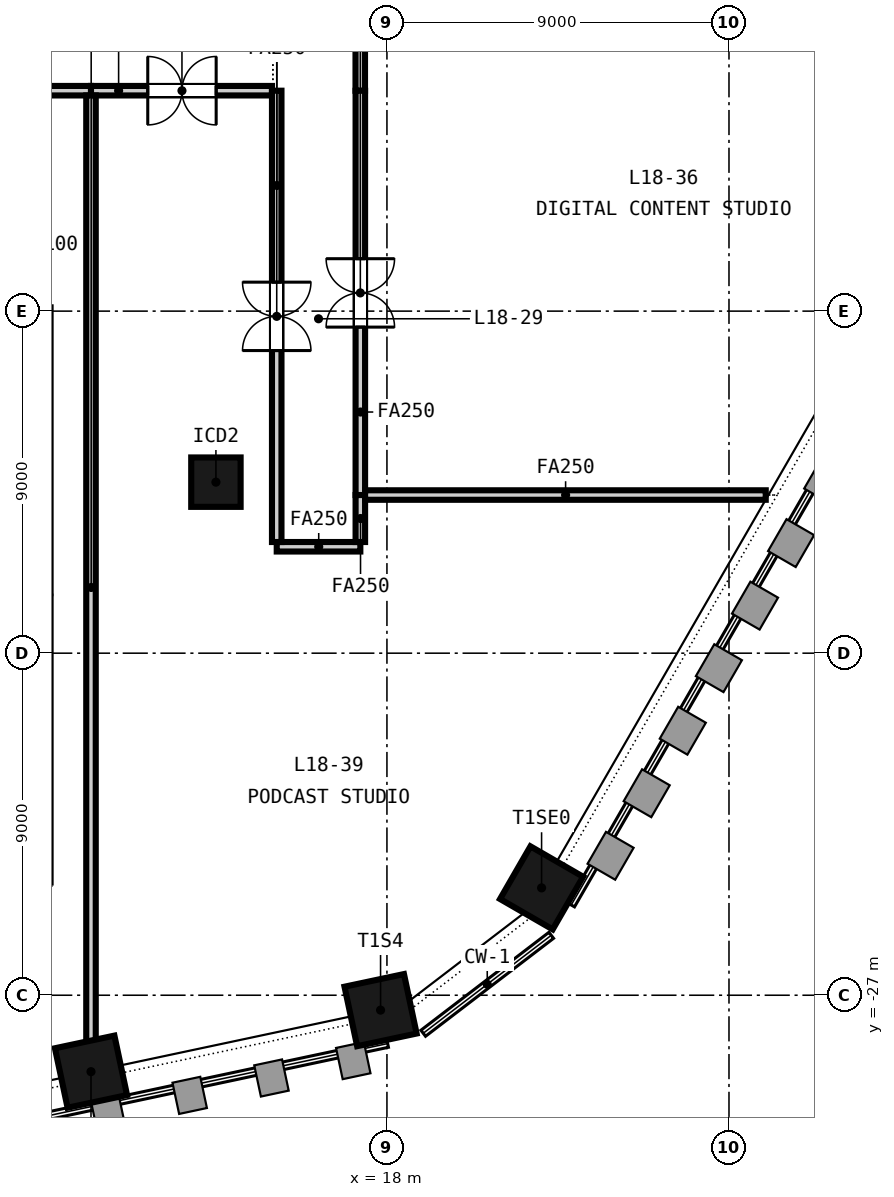
"""IFC4 building model, lengths in metres.
Left out: names, types, materials, properties, quantities, classifications, styles, units other than length and angle.
Written with IfcOpenShell. Run it as: python <this file> out.ifc"""

import sys

from ifc_helpers import new_model, si_unit, direction, frame, frame_2d, origin, origin_2d, place, context, subcontext, project, spatial, rectangle, extrude, element, fill, save


model = new_model("IFC4")
c1 = context("Model", 3, precision=1e-05, world=origin(), true_north=direction((0.0, 1.0)))
c2 = subcontext(c1, "Body", "Model", "MODEL_VIEW")
j1 = project(units=[si_unit("LENGTHUNIT", "METRE"), si_unit("PLANEANGLEUNIT", "RADIAN")], contexts=[c1])
p1 = place(None, origin())
s1 = spatial("IfcSite", under=j1, at=p1, CompositionType="ELEMENT")
p2 = place(p1, origin())
s2 = spatial("IfcBuilding", under=s1, at=p2, CompositionType="ELEMENT")
p3 = place(p2, frame((0.0, 0.0, 80.65)))
s3 = spatial("IfcBuildingStorey", under=s2, at=p3, CompositionType="ELEMENT", Elevation=80.65)
for number, where, z_axis, x_axis in (
    (1, (10.213, -29.011, -0.15), (0.0, 0.0, 1.0), (0.978, 0.208, 0.0)),
    (2, (17.832, -27.392, -0.15), (0.0, 0.0, 1.0), (0.978, 0.208, 0.0)),
    (3, (22.069, -24.175, -0.15), (0.0, 0.0, 1.0), (0.5, 0.866, 0.0)),
):
    element("IfcColumn", number, at=place(p3, frame(where, z_axis=z_axis, x_axis=x_axis)), inside=s3, PredefinedType="COLUMN", context=c2, shape_type="SweptSolid", body=[
        extrude(rectangle(XDim=1.6, YDim=1.6, at=origin_2d()), origin(), (0.0, 0.0, 1.0), 3.65),
    ])
p4 = place(p3, frame((13.5, -13.5, -0.15), z_axis=(0.0, 0.0, 1.0), x_axis=(1.0, 0.0, 0.0)))
e4 = element("IfcColumn", 4, at=p4, inside=s3, PredefinedType="COLUMN", context=c2, shape_type="SweptSolid", body=[
    extrude(rectangle(XDim=1.3, YDim=1.3, at=origin_2d()), origin(), (0.0, 0.0, 1.0), 3.65),
])
p5 = place(p3, frame((10.213, -3.2, 0.0), z_axis=(0.0, 0.0, 1.0), x_axis=(-1.0, 0.0, 0.0)))
e5 = element("IfcWall", 5, at=p5, inside=s3, PredefinedType="PARTITIONING", context=c2, shape_type="SweptSolid", body=[
    extrude(rectangle(XDim=25.188, YDim=0.25, at=frame_2d((12.594, 0.0))), origin(), (0.0, 0.0, 1.0), 2.741),
])
p6 = place(p5, frame((11.707, 0.0, 0.0)))
e6 = element("IfcOpeningElement", 6, at=p6, cuts=e5, PredefinedType="OPENING", context=c2, shape_type="SweptSolid", body=[
    extrude(rectangle(XDim=1.8, YDim=2.1, at=frame_2d((0.9, 1.05))), frame((0.0, 0.135, 0.0), z_axis=(0.0, -1.0, 0.0), x_axis=(1.0, 0.0, 0.0)), (0.0, 0.0, 1.0), 0.27),
])
p7 = place(p3, frame((14.975, -3.2, 0.0), z_axis=(0.0, 0.0, 1.0), x_axis=(-1.0, 0.0, 0.0)))
e7 = element("IfcWall", 7, at=p7, inside=s3, PredefinedType="PARTITIONING", context=c2, shape_type="SweptSolid", body=[
    extrude(rectangle(XDim=4.762, YDim=0.25, at=frame_2d((2.381, 0.0))), origin(), (0.0, 0.0, 1.0), 2.741),
])
p8 = place(p7, frame((1.469, 0.0, 0.0)))
e8 = element("IfcOpeningElement", 8, at=p8, cuts=e7, PredefinedType="OPENING", context=c2, shape_type="SweptSolid", body=[
    extrude(rectangle(XDim=1.8, YDim=2.1, at=frame_2d((0.9, 1.05))), frame((0.0, 0.135, 0.0), z_axis=(0.0, -1.0, 0.0), x_axis=(1.0, 0.0, 0.0)), (0.0, 0.0, 1.0), 0.27),
])
p9 = place(p3, frame((17.298, 2.102, 0.0), z_axis=(0.0, 0.0, 1.0), x_axis=(0.0, -1.0, 0.0)))
e9 = element("IfcWall", 9, at=p9, inside=s3, PredefinedType="PARTITIONING", context=c2, shape_type="SweptSolid", body=[
    extrude(rectangle(XDim=5.304, YDim=0.25, at=frame_2d((2.652, 0.0))), origin(), (0.0, 0.0, 1.0), 2.741),
])
p10 = place(p3, frame((17.3, -3.202, 0.0), z_axis=(0.0, 0.0, 1.0), x_axis=(0.0, -1.0, 0.0)))
e10 = element("IfcWall", 10, at=p10, inside=s3, PredefinedType="PARTITIONING", context=c2, shape_type="SweptSolid", body=[
    extrude(rectangle(XDim=10.637, YDim=0.25, at=frame_2d((5.319, 0.0))), origin(), (0.0, 0.0, 1.0), 2.741),
])
p11 = place(p10, frame((4.418, 0.0, 0.0)))
e11 = element("IfcOpeningElement", 11, at=p11, cuts=e10, PredefinedType="OPENING", context=c2, shape_type="SweptSolid", body=[
    extrude(rectangle(XDim=1.8, YDim=2.1, at=frame_2d((0.9, 1.05))), frame((0.0, 0.135, 0.0), z_axis=(0.0, -1.0, 0.0), x_axis=(1.0, 0.0, 0.0)), (0.0, 0.0, 1.0), 0.27),
])
p12 = place(p3, frame((17.3, -15.2, 0.0), z_axis=(0.0, 0.0, 1.0), x_axis=(-1.0, 0.0, 0.0)))
e12 = element("IfcWall", 12, at=p12, inside=s3, PredefinedType="PARTITIONING", context=c2, shape_type="SweptSolid", body=[
    extrude(rectangle(XDim=2.2, YDim=0.25, at=frame_2d((1.1, 0.0))), origin(), (0.0, 0.0, 1.0), 2.741),
])
p13 = place(p3, frame((17.3, -13.839, 0.0), z_axis=(0.0, 0.0, 1.0), x_axis=(0.0, -1.0, 0.0)))
e13 = element("IfcWall", 13, at=p13, inside=s3, PredefinedType="PARTITIONING", context=c2, shape_type="SweptSolid", body=[
    extrude(rectangle(XDim=1.236, YDim=0.25, at=frame_2d((0.618, 0.0))), origin(), (0.0, 0.0, 1.0), 2.741),
])
p14 = place(p3, frame((17.425, -13.839, 0.0), z_axis=(0.0, 0.0, 1.0), x_axis=(1.0, 0.0, 0.0)))
e14 = element("IfcWall", 14, at=p14, inside=s3, PredefinedType="PARTITIONING", context=c2, shape_type="SweptSolid", body=[
    extrude(rectangle(XDim=10.542, YDim=0.25, at=frame_2d((5.271, 0.0))), origin(), (0.0, 0.0, 1.0), 2.741),
])
p15 = place(p3, frame((10.213, -29.216, 0.0), z_axis=(0.0, 0.0, 1.0), x_axis=(0.0, 1.0, 0.0)))
e15 = element("IfcWall", 15, at=p15, inside=s3, PredefinedType="PARTITIONING", context=c2, shape_type="SweptSolid", body=[
    extrude(rectangle(XDim=25.891, YDim=0.25, at=frame_2d((12.946, 0.0))), origin(), (0.0, 0.0, 1.0), 2.741),
])
p16 = place(p3, frame((15.1, -15.075, 0.0), z_axis=(0.0, 0.0, 1.0), x_axis=(0.0, 1.0, 0.0)))
e16 = element("IfcWall", 16, at=p16, inside=s3, PredefinedType="PARTITIONING", context=c2, shape_type="SweptSolid", body=[
    extrude(rectangle(XDim=11.875, YDim=0.25, at=frame_2d((5.938, 0.0))), origin(), (0.0, 0.0, 1.0), 2.741),
])
p17 = place(p16, frame((5.038, 0.0, 0.0)))
e17 = element("IfcOpeningElement", 17, at=p17, cuts=e16, PredefinedType="OPENING", context=c2, shape_type="SweptSolid", body=[
    extrude(rectangle(XDim=1.8, YDim=2.1, at=frame_2d((0.9, 1.05))), frame((0.0, 0.135, 0.0), z_axis=(0.0, -1.0, 0.0), x_axis=(1.0, 0.0, 0.0)), (0.0, 0.0, 1.0), 0.27),
])
p18 = place(p11, origin())
e18 = element("IfcDoor", 18, at=p18, inside=s3, OperationType="DOUBLE_DOOR_DOUBLE_SWING", PredefinedType="DOOR", context=c2, shape_type="SweptSolid", body=[
    extrude(rectangle(XDim=1.8, YDim=2.1, at=frame_2d((0.9, 1.05))), frame((0.0, 0.025, 0.0), z_axis=(0.0, -1.0, 0.0), x_axis=(1.0, 0.0, 0.0)), (0.0, 0.0, 1.0), 0.05),
])
fill(e11, e18)
p19 = place(p17, origin())
e19 = element("IfcDoor", 19, at=p19, inside=s3, OperationType="DOUBLE_DOOR_DOUBLE_SWING", PredefinedType="DOOR", context=c2, shape_type="SweptSolid", body=[
    extrude(rectangle(XDim=1.8, YDim=2.1, at=frame_2d((0.9, 1.05))), frame((0.0, 0.025, 0.0), z_axis=(0.0, -1.0, 0.0), x_axis=(1.0, 0.0, 0.0)), (0.0, 0.0, 1.0), 0.05),
])
fill(e17, e19)
p20 = place(p8, origin())
e20 = element("IfcDoor", 20, at=p20, inside=s3, OperationType="DOUBLE_DOOR_DOUBLE_SWING", PredefinedType="DOOR", context=c2, shape_type="SweptSolid", body=[
    extrude(rectangle(XDim=1.8, YDim=2.1, at=frame_2d((0.9, 1.05))), frame((0.0, 0.025, 0.0), z_axis=(0.0, -1.0, 0.0), x_axis=(1.0, 0.0, 0.0)), (0.0, 0.0, 1.0), 0.05),
])
fill(e8, e20)
save(model, sys.argv[1])
